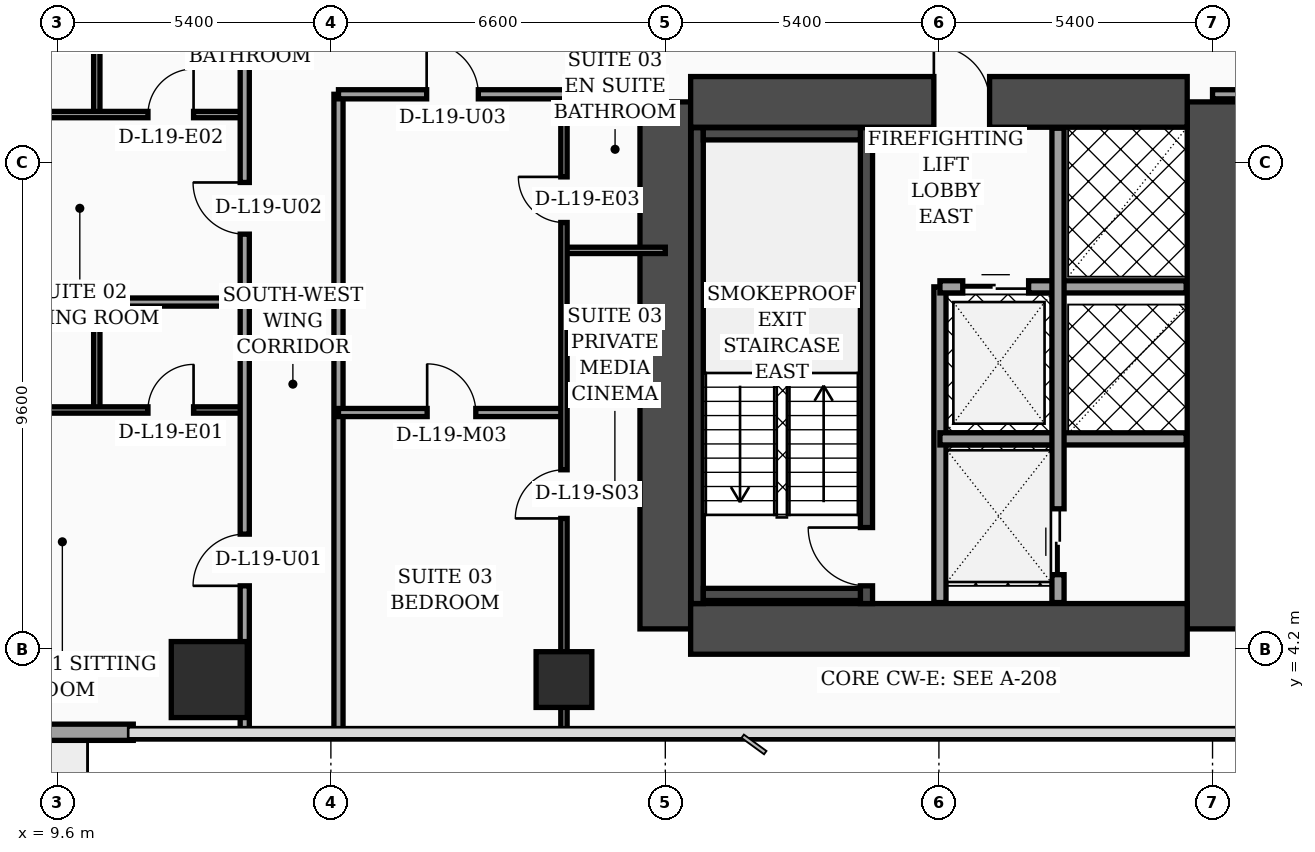
"""IFC4 building model, lengths in metres.
Left out: names, types, materials, properties, quantities, classifications, styles, units other than length and angle.
Written with IfcOpenShell. Run it as: python <this file> out.ifc"""

import sys

from ifc_helpers import new_model, si_unit, direction, frame, frame_2d, origin, origin_2d, place, context, subcontext, project, spatial, rectangle, hollow_rectangle, extrude, element, fill, save


model = new_model("IFC4")
c1 = context("Model", 3, precision=1e-05, world=origin(), true_north=direction((0.0, 1.0)))
c2 = subcontext(c1, "Body", "Model", "MODEL_VIEW")
j1 = project(units=[si_unit("LENGTHUNIT", "METRE"), si_unit("PLANEANGLEUNIT", "RADIAN")], contexts=[c1])
p1 = place(None, origin())
s1 = spatial("IfcSite", under=j1, at=p1, CompositionType="ELEMENT")
p2 = place(p1, origin())
s2 = spatial("IfcBuilding", under=s1, at=p2, CompositionType="ELEMENT")
p3 = place(p2, frame((0.0, 0.0, 81.2)))
s3 = spatial("IfcBuildingStorey", under=s2, at=p3, CompositionType="ELEMENT", Elevation=81.2)
for number, where, z_axis, x_axis in (
    (1, (21.6, 4.6, 0.0), (0.0, 0.0, 1.0), (0.0, 1.0, 0.0)),
    (2, (32.4, 4.6, 0.0), (0.0, 0.0, 1.0), (0.0, 1.0, 0.0)),
):
    element("IfcWall", number, at=place(p3, frame(where, z_axis=z_axis, x_axis=x_axis)), inside=s3, PredefinedType="SHEAR", context=c2, shape_type="SweptSolid", body=[
        extrude(rectangle(XDim=10.4, YDim=1.0, at=frame_2d((5.2, 0.0))), origin(), (0.0, 0.0, 1.0), 3.56),
    ])
p4 = place(p3, frame((22.1, 15.0, 0.0), z_axis=(0.0, 0.0, 1.0), x_axis=(1.0, 0.0, 0.0)))
e3 = element("IfcWall", 3, at=p4, inside=s3, PredefinedType="SHEAR", context=c2, shape_type="SweptSolid", body=[
    extrude(rectangle(XDim=9.8, YDim=1.0, at=frame_2d((4.9, 0.0))), origin(), (0.0, 0.0, 1.0), 3.56),
])
p5 = place(p4, frame((4.8, 0.0, 0.0)))
e4 = element("IfcOpeningElement", 4, at=p5, cuts=e3, PredefinedType="OPENING", context=c2, shape_type="SweptSolid", body=[
    extrude(rectangle(XDim=1.1, YDim=2.2, at=frame_2d((0.55, 1.1))), frame((0.0, 0.51, 0.0), z_axis=(0.0, -1.0, 0.0), x_axis=(1.0, 0.0, 0.0)), (0.0, 0.0, 1.0), 1.02),
])
p6 = place(p3, frame((22.1, 4.6, 0.0), z_axis=(0.0, 0.0, 1.0), x_axis=(1.0, 0.0, 0.0)))
e5 = element("IfcWall", 5, at=p6, inside=s3, PredefinedType="SHEAR", context=c2, shape_type="SweptSolid", body=[
    extrude(rectangle(XDim=9.8, YDim=1.0, at=frame_2d((4.9, 0.0))), origin(), (0.0, 0.0, 1.0), 3.56),
])
p7 = place(p3, frame((22.23, 5.1, 0.0), z_axis=(0.0, 0.0, 1.0), x_axis=(0.0, 1.0, 0.0)))
e6 = element("IfcWall", 6, at=p7, inside=s3, PredefinedType="SOLIDWALL", context=c2, shape_type="SweptSolid", body=[
    extrude(rectangle(XDim=9.39, YDim=0.24, at=frame_2d((4.695, 0.0))), origin(), (0.0, 0.0, 1.0), 3.56),
])
p8 = place(p3, frame((25.57, 5.1, 0.0), z_axis=(0.0, 0.0, 1.0), x_axis=(0.0, 1.0, 0.0)))
e7 = element("IfcWall", 7, at=p8, inside=s3, PredefinedType="SOLIDWALL", context=c2, shape_type="SweptSolid", body=[
    extrude(rectangle(XDim=9.39, YDim=0.24, at=frame_2d((4.695, 0.0))), origin(), (0.0, 0.0, 1.0), 3.56),
])
p9 = place(p8, frame((0.35, 0.0, 0.0)))
e8 = element("IfcOpeningElement", 8, at=p9, cuts=e7, PredefinedType="OPENING", context=c2, shape_type="SweptSolid", body=[
    extrude(rectangle(XDim=1.15, YDim=2.2, at=frame_2d((0.575, 1.1))), frame((0.0, 0.13, 0.0), z_axis=(0.0, -1.0, 0.0), x_axis=(1.0, 0.0, 0.0)), (0.0, 0.0, 1.0), 0.26),
])
for number, where, z_axis, x_axis in (
    (9, (22.35, 5.28, 0.0), (0.0, 0.0, 1.0), (1.0, 0.0, 0.0)),
    (10, (22.35, 14.37, 0.0), (0.0, 0.0, 1.0), (1.0, 0.0, 0.0)),
):
    element("IfcWall", number, at=place(p3, frame(where, z_axis=z_axis, x_axis=x_axis)), inside=s3, PredefinedType="SOLIDWALL", context=c2, shape_type="SweptSolid", body=[
        extrude(rectangle(XDim=3.1, YDim=0.24, at=frame_2d((1.55, 0.0))), origin(), (0.0, 0.0, 1.0), 3.56),
    ])
p10 = place(p3, frame((12.6, 3.6, 0.0), z_axis=(0.0, 0.0, 1.0), x_axis=(1.0, 0.0, 0.0)))
e11 = element("IfcColumn", 11, at=p10, inside=s3, PredefinedType="COLUMN", context=c2, shape_type="SweptSolid", body=[
    extrude(rectangle(XDim=1.5, YDim=1.5, at=origin_2d()), origin(), (0.0, 0.0, 1.0), 3.56),
])
p11 = place(p3, frame((19.6, 3.6, 0.0), z_axis=(0.0, 0.0, 1.0), x_axis=(1.0, 0.0, 0.0)))
e12 = element("IfcColumn", 12, at=p11, inside=s3, PredefinedType="COLUMN", context=c2, shape_type="SweptSolid", body=[
    extrude(hollow_rectangle(XDim=1.1, YDim=1.1, WallThickness=0.045, at=origin_2d()), origin(), (0.0, 0.0, 1.0), 3.56),
])
p12 = place(p3, frame((3.1, 2.56, 0.0), z_axis=(0.0, 0.0, 1.0), x_axis=(1.0, 0.0, 0.0)))
e13 = element("IfcWall", 13, at=p12, inside=s3, PredefinedType="SOLIDWALL", context=c2, shape_type="SweptSolid", body=[
    extrude(rectangle(XDim=8.0, YDim=0.32, at=frame_2d((4.0, 0.0))), origin(), (0.0, 0.0, 1.0), 3.56),
])
p13 = place(p12, frame((0.45, 0.0, 0.75)))
e14 = element("IfcOpeningElement", 14, at=p13, cuts=e13, PredefinedType="OPENING", context=c2, shape_type="SweptSolid", body=[
    extrude(rectangle(XDim=1.0, YDim=1.6, at=frame_2d((0.5, 0.8))), frame((0.0, 0.17, 0.0), z_axis=(0.0, -1.0, 0.0), x_axis=(1.0, 0.0, 0.0)), (0.0, 0.0, 1.0), 0.34),
])
p14 = place(p12, frame((4.2, 0.0, 0.0)))
e15 = element("IfcOpeningElement", 15, at=p14, cuts=e13, PredefinedType="OPENING", context=c2, shape_type="SweptSolid", body=[
    extrude(rectangle(XDim=1.4, YDim=2.25, at=frame_2d((0.7, 1.125))), frame((0.0, 0.17, 0.0), z_axis=(0.0, -1.0, 0.0), x_axis=(1.0, 0.0, 0.0)), (0.0, 0.0, 1.0), 0.34),
])
p15 = place(p3, frame((27.02, 5.12, 0.0), z_axis=(0.0, 0.0, 1.0), x_axis=(0.0, 1.0, 0.0)))
e16 = element("IfcWall", 16, at=p15, inside=s3, PredefinedType="SOLIDWALL", context=c2, shape_type="SweptSolid", body=[
    extrude(rectangle(XDim=6.23, YDim=0.24, at=frame_2d((3.115, 0.0))), origin(), (0.0, 0.0, 1.0), 3.56),
])
p16 = place(p3, frame((27.02, 11.35, 0.0), z_axis=(0.0, 0.0, 1.0), x_axis=(1.0, 0.0, 0.0)))
e17 = element("IfcWall", 17, at=p16, inside=s3, PredefinedType="SOLIDWALL", context=c2, shape_type="SweptSolid", body=[
    extrude(rectangle(XDim=4.86, YDim=0.24, at=frame_2d((2.43, 0.0))), origin(), (0.0, 0.0, 1.0), 3.56),
])
p17 = place(p16, frame((0.45, 0.0, 0.0)))
e18 = element("IfcOpeningElement", 18, at=p17, cuts=e17, PredefinedType="OPENING", context=c2, shape_type="SweptSolid", body=[
    extrude(rectangle(XDim=1.3, YDim=2.35, at=frame_2d((0.65, 1.175))), frame((0.0, 0.13, 0.0), z_axis=(0.0, -1.0, 0.0), x_axis=(1.0, 0.0, 0.0)), (0.0, 0.0, 1.0), 0.26),
])
p18 = place(p3, frame((27.02, 8.35, 0.0), z_axis=(0.0, 0.0, 1.0), x_axis=(1.0, 0.0, 0.0)))
e19 = element("IfcWall", 19, at=p18, inside=s3, PredefinedType="SOLIDWALL", context=c2, shape_type="SweptSolid", body=[
    extrude(rectangle(XDim=4.86, YDim=0.24, at=frame_2d((2.43, 0.0))), origin(), (0.0, 0.0, 1.0), 3.56),
])
p19 = place(p3, frame((29.35, 5.12, 0.0), z_axis=(0.0, 0.0, 1.0), x_axis=(0.0, 1.0, 0.0)))
e20 = element("IfcWall", 20, at=p19, inside=s3, PredefinedType="SOLIDWALL", context=c2, shape_type="SweptSolid", body=[
    extrude(rectangle(XDim=9.36, YDim=0.24, at=frame_2d((4.68, 0.0))), origin(), (0.0, 0.0, 1.0), 3.56),
])
p20 = place(p19, frame((0.55, 0.0, 0.0)))
e21 = element("IfcOpeningElement", 21, at=p20, cuts=e20, PredefinedType="OPENING", context=c2, shape_type="SweptSolid", body=[
    extrude(rectangle(XDim=1.3, YDim=2.35, at=frame_2d((0.65, 1.175))), frame((0.0, 0.13, 0.0), z_axis=(0.0, -1.0, 0.0), x_axis=(1.0, 0.0, 0.0)), (0.0, 0.0, 1.0), 0.26),
])
p21 = place(p3, frame((10.38, 8.92, 0.0), z_axis=(0.0, 0.0, 1.0), x_axis=(0.0, 1.0, 0.0)))
e22 = element("IfcWall", 22, at=p21, inside=s3, PredefinedType="PARTITIONING", context=c2, shape_type="SweptSolid", body=[
    extrude(rectangle(XDim=2.13, YDim=0.125, at=frame_2d((1.065, 0.0))), origin(), (0.0, 0.0, 1.0), 3.09),
])
p22 = place(p3, frame((3.2, 8.92, 0.0), z_axis=(0.0, 0.0, 1.0), x_axis=(1.0, 0.0, 0.0)))
e23 = element("IfcWall", 23, at=p22, inside=s3, PredefinedType="PARTITIONING", context=c2, shape_type="SweptSolid", body=[
    extrude(rectangle(XDim=10.1, YDim=0.125, at=frame_2d((5.05, 0.0))), origin(), (0.0, 0.0, 1.0), 2.84),
])
p23 = place(p22, frame((3.29, 0.0, 0.0)))
e24 = element("IfcOpeningElement", 24, at=p23, cuts=e23, PredefinedType="OPENING", context=c2, shape_type="SweptSolid", body=[
    extrude(rectangle(XDim=0.96, YDim=2.2, at=frame_2d((0.48, 1.1))), frame((0.0, 0.073, 0.0), z_axis=(0.0, -1.0, 0.0), x_axis=(1.0, 0.0, 0.0)), (0.0, 0.0, 1.0), 0.145),
])
p24 = place(p22, frame((8.19, 0.0, 0.0)))
e25 = element("IfcOpeningElement", 25, at=p24, cuts=e23, PredefinedType="OPENING", context=c2, shape_type="SweptSolid", body=[
    extrude(rectangle(XDim=0.9, YDim=2.15, at=frame_2d((0.45, 1.075))), frame((0.0, 0.073, 0.0), z_axis=(0.0, -1.0, 0.0), x_axis=(1.0, 0.0, 0.0)), (0.0, 0.0, 1.0), 0.145),
])
p25 = place(p3, frame((10.38, 14.75, 0.0), z_axis=(0.0, 0.0, 1.0), x_axis=(0.0, 1.0, 0.0)))
e26 = element("IfcWall", 26, at=p25, inside=s3, PredefinedType="PARTITIONING", context=c2, shape_type="SweptSolid", body=[
    extrude(rectangle(XDim=2.05, YDim=0.125, at=frame_2d((1.025, 0.0))), origin(), (0.0, 0.0, 1.0), 3.56),
])
p26 = place(p3, frame((0.08, 14.75, 0.0), z_axis=(0.0, 0.0, 1.0), x_axis=(1.0, 0.0, 0.0)))
e27 = element("IfcWall", 27, at=p26, inside=s3, PredefinedType="PARTITIONING", context=c2, shape_type="SweptSolid", body=[
    extrude(rectangle(XDim=13.22, YDim=0.125, at=frame_2d((6.61, 0.0))), origin(), (0.0, 0.0, 1.0), 2.84),
])
p27 = place(p26, frame((4.67, 0.0, 0.0)))
e28 = element("IfcOpeningElement", 28, at=p27, cuts=e27, PredefinedType="OPENING", context=c2, shape_type="SweptSolid", body=[
    extrude(rectangle(XDim=0.96, YDim=2.2, at=frame_2d((0.48, 1.1))), frame((0.0, 0.073, 0.0), z_axis=(0.0, -1.0, 0.0), x_axis=(1.0, 0.0, 0.0)), (0.0, 0.0, 1.0), 0.145),
])
p28 = place(p26, frame((11.31, 0.0, 0.0)))
e29 = element("IfcOpeningElement", 29, at=p28, cuts=e27, PredefinedType="OPENING", context=c2, shape_type="SweptSolid", body=[
    extrude(rectangle(XDim=0.9, YDim=2.15, at=frame_2d((0.45, 1.075))), frame((0.0, 0.073, 0.0), z_axis=(0.0, -1.0, 0.0), x_axis=(1.0, 0.0, 0.0)), (0.0, 0.0, 1.0), 0.145),
])
p29 = place(p3, frame((0.08, 11.05, 0.0), z_axis=(0.0, 0.0, 1.0), x_axis=(1.0, 0.0, 0.0)))
e30 = element("IfcWall", 30, at=p29, inside=s3, PredefinedType="PARTITIONING", context=c2, shape_type="SweptSolid", body=[
    extrude(rectangle(XDim=13.22, YDim=0.16, at=frame_2d((6.61, 0.0))), origin(), (0.0, 0.0, 1.0), 2.84),
])
p30 = place(p3, frame((13.3, 2.44, 0.0), z_axis=(0.0, 0.0, 1.0), x_axis=(0.0, 1.0, 0.0)))
e31 = element("IfcWall", 31, at=p30, inside=s3, PredefinedType="PARTITIONING", context=c2, shape_type="SweptSolid", body=[
    extrude(rectangle(XDim=14.36, YDim=0.18, at=frame_2d((7.18, 0.0))), origin(), (0.0, 0.0, 1.0), 3.04),
])
p31 = place(p30, frame((3.01, 0.0, 0.0)))
e32 = element("IfcOpeningElement", 32, at=p31, cuts=e31, PredefinedType="OPENING", context=c2, shape_type="SweptSolid", body=[
    extrude(rectangle(XDim=1.02, YDim=2.2, at=frame_2d((0.51, 1.1))), frame((0.0, 0.1, 0.0), z_axis=(0.0, -1.0, 0.0), x_axis=(1.0, 0.0, 0.0)), (0.0, 0.0, 1.0), 0.2),
])
p32 = place(p30, frame((9.95, 0.0, 0.0)))
e33 = element("IfcOpeningElement", 33, at=p32, cuts=e31, PredefinedType="OPENING", context=c2, shape_type="SweptSolid", body=[
    extrude(rectangle(XDim=1.02, YDim=2.2, at=frame_2d((0.51, 1.1))), frame((0.0, 0.1, 0.0), z_axis=(0.0, -1.0, 0.0), x_axis=(1.0, 0.0, 0.0)), (0.0, 0.0, 1.0), 0.2),
])
p33 = place(p3, frame((15.15, 2.44, 0.0), z_axis=(0.0, 0.0, 1.0), x_axis=(0.0, 1.0, 0.0)))
e34 = element("IfcWall", 34, at=p33, inside=s3, PredefinedType="PARTITIONING", context=c2, shape_type="SweptSolid", body=[
    extrude(rectangle(XDim=12.71, YDim=0.18, at=frame_2d((6.355, 0.0))), origin(), (0.0, 0.0, 1.0), 3.04),
])
p34 = place(p3, frame((19.6, 12.07, 0.0), z_axis=(0.0, 0.0, 1.0), x_axis=(1.0, 0.0, 0.0)))
e35 = element("IfcWall", 35, at=p34, inside=s3, PredefinedType="PARTITIONING", context=c2, shape_type="SweptSolid", body=[
    extrude(rectangle(XDim=2.0, YDim=0.125, at=frame_2d((1.0, 0.0))), origin(), (0.0, 0.0, 1.0), 3.56),
])
p35 = place(p3, frame((15.15, 8.87, 0.0), z_axis=(0.0, 0.0, 1.0), x_axis=(1.0, 0.0, 0.0)))
e36 = element("IfcWall", 36, at=p35, inside=s3, PredefinedType="PARTITIONING", context=c2, shape_type="SweptSolid", body=[
    extrude(rectangle(XDim=4.45, YDim=0.16, at=frame_2d((2.225, 0.0))), origin(), (0.0, 0.0, 1.0), 3.56),
])
p36 = place(p35, frame((1.75, 0.0, 0.0)))
e37 = element("IfcOpeningElement", 37, at=p36, cuts=e36, PredefinedType="OPENING", context=c2, shape_type="SweptSolid", body=[
    extrude(rectangle(XDim=0.96, YDim=2.2, at=frame_2d((0.48, 1.1))), frame((0.0, 0.09, 0.0), z_axis=(0.0, -1.0, 0.0), x_axis=(1.0, 0.0, 0.0)), (0.0, 0.0, 1.0), 0.18),
])
p37 = place(p3, frame((19.6, 2.44, 0.0), z_axis=(0.0, 0.0, 1.0), x_axis=(0.0, 1.0, 0.0)))
e38 = element("IfcWall", 38, at=p37, inside=s3, PredefinedType="PARTITIONING", context=c2, shape_type="SweptSolid", body=[
    extrude(rectangle(XDim=12.71, YDim=0.125, at=frame_2d((6.355, 0.0))), origin(), (0.0, 0.0, 1.0), 2.34),
])
p38 = place(p37, frame((4.34, 0.0, 0.0)))
e39 = element("IfcOpeningElement", 39, at=p38, cuts=e38, PredefinedType="OPENING", context=c2, shape_type="SweptSolid", body=[
    extrude(rectangle(XDim=0.96, YDim=2.2, at=frame_2d((0.48, 1.1))), frame((0.0, 0.073, 0.0), z_axis=(0.0, -1.0, 0.0), x_axis=(1.0, 0.0, 0.0)), (0.0, 0.0, 1.0), 0.145),
])
p39 = place(p37, frame((10.18, 0.0, 0.0)))
e40 = element("IfcOpeningElement", 40, at=p39, cuts=e38, PredefinedType="OPENING", context=c2, shape_type="SweptSolid", body=[
    extrude(rectangle(XDim=0.9, YDim=2.15, at=frame_2d((0.45, 1.075))), frame((0.0, 0.073, 0.0), z_axis=(0.0, -1.0, 0.0), x_axis=(1.0, 0.0, 0.0)), (0.0, 0.0, 1.0), 0.145),
])
p40 = place(p3, frame((15.15, 15.15, 0.0), z_axis=(0.0, 0.0, 1.0), x_axis=(1.0, 0.0, 0.0)))
e41 = element("IfcWall", 41, at=p40, inside=s3, PredefinedType="PARTITIONING", context=c2, shape_type="SweptSolid", body=[
    extrude(rectangle(XDim=6.45, YDim=0.18, at=frame_2d((3.225, 0.0))), origin(), (0.0, 0.0, 1.0), 2.34),
])
p41 = place(p40, frame((1.74, 0.0, 0.0)))
e42 = element("IfcOpeningElement", 42, at=p41, cuts=e41, PredefinedType="OPENING", context=c2, shape_type="SweptSolid", body=[
    extrude(rectangle(XDim=1.02, YDim=2.2, at=frame_2d((0.51, 1.1))), frame((0.0, 0.1, 0.0), z_axis=(0.0, -1.0, 0.0), x_axis=(1.0, 0.0, 0.0)), (0.0, 0.0, 1.0), 0.2),
])
p42 = place(p3, frame((32.4, 15.15, 0.0), z_axis=(0.0, 0.0, 1.0), x_axis=(1.0, 0.0, 0.0)))
e43 = element("IfcWall", 43, at=p42, inside=s3, PredefinedType="PARTITIONING", context=c2, shape_type="SweptSolid", body=[
    extrude(rectangle(XDim=20.85, YDim=0.18, at=frame_2d((10.425, 0.0))), origin(), (0.0, 0.0, 1.0), 2.84),
])
p43 = place(p42, frame((1.1, 0.0, 0.0)))
e44 = element("IfcOpeningElement", 44, at=p43, cuts=e43, PredefinedType="OPENING", context=c2, shape_type="SweptSolid", body=[
    extrude(rectangle(XDim=1.5, YDim=2.22, at=frame_2d((0.75, 1.11))), frame((0.0, 0.1, 0.0), z_axis=(0.0, -1.0, 0.0), x_axis=(1.0, 0.0, 0.0)), (0.0, 0.0, 1.0), 0.2),
])
p44 = place(p42, frame((9.94, 0.0, 0.0)))
e45 = element("IfcOpeningElement", 45, at=p44, cuts=e43, PredefinedType="OPENING", context=c2, shape_type="SweptSolid", body=[
    extrude(rectangle(XDim=1.02, YDim=2.2, at=frame_2d((0.51, 1.1))), frame((0.0, 0.1, 0.0), z_axis=(0.0, -1.0, 0.0), x_axis=(1.0, 0.0, 0.0)), (0.0, 0.0, 1.0), 0.2),
])
p45 = place(p42, frame((15.92, 0.0, 0.0)))
e46 = element("IfcOpeningElement", 46, at=p45, cuts=e43, PredefinedType="OPENING", context=c2, shape_type="SweptSolid", body=[
    extrude(rectangle(XDim=1.02, YDim=2.2, at=frame_2d((0.51, 1.1))), frame((0.0, 0.1, 0.0), z_axis=(0.0, -1.0, 0.0), x_axis=(1.0, 0.0, 0.0)), (0.0, 0.0, 1.0), 0.2),
])
p46 = place(p17, origin())
e47 = element("IfcDoor", 47, at=p46, inside=s3, OperationType="DOUBLE_DOOR_SLIDING", PredefinedType="DOOR", context=c2, shape_type="SweptSolid", body=[
    extrude(rectangle(XDim=1.3, YDim=2.35, at=frame_2d((0.65, 1.175))), frame((0.0, 0.025, 0.0), z_axis=(0.0, -1.0, 0.0), x_axis=(1.0, 0.0, 0.0)), (0.0, 0.0, 1.0), 0.05),
])
fill(e18, e47)
p47 = place(p20, origin())
e48 = element("IfcDoor", 48, at=p47, inside=s3, OperationType="DOUBLE_DOOR_SLIDING", PredefinedType="DOOR", context=c2, shape_type="SweptSolid", body=[
    extrude(rectangle(XDim=1.3, YDim=2.35, at=frame_2d((0.65, 1.175))), frame((0.0, 0.025, 0.0), z_axis=(0.0, -1.0, 0.0), x_axis=(1.0, 0.0, 0.0)), (0.0, 0.0, 1.0), 0.05),
])
fill(e21, e48)
p48 = place(p24, origin())
e49 = element("IfcDoor", 49, at=p48, inside=s3, OperationType="SINGLE_SWING_RIGHT", PredefinedType="DOOR", context=c2, shape_type="SweptSolid", body=[
    extrude(rectangle(XDim=0.9, YDim=2.15, at=frame_2d((0.45, 1.075))), frame((0.0, 0.025, 0.0), z_axis=(0.0, -1.0, 0.0), x_axis=(1.0, 0.0, 0.0)), (0.0, 0.0, 1.0), 0.05),
])
fill(e25, e49)
p49 = place(p28, origin())
e50 = element("IfcDoor", 50, at=p49, inside=s3, OperationType="SINGLE_SWING_RIGHT", PredefinedType="DOOR", context=c2, shape_type="SweptSolid", body=[
    extrude(rectangle(XDim=0.9, YDim=2.15, at=frame_2d((0.45, 1.075))), frame((0.0, 0.025, 0.0), z_axis=(0.0, -1.0, 0.0), x_axis=(1.0, 0.0, 0.0)), (0.0, 0.0, 1.0), 0.05),
])
fill(e29, e50)
p50 = place(p31, origin())
e51 = element("IfcDoor", 51, at=p50, inside=s3, OperationType="SINGLE_SWING_LEFT", PredefinedType="DOOR", context=c2, shape_type="SweptSolid", body=[
    extrude(rectangle(XDim=1.02, YDim=2.2, at=frame_2d((0.51, 1.1))), frame((0.0, 0.025, 0.0), z_axis=(0.0, -1.0, 0.0), x_axis=(1.0, 0.0, 0.0)), (0.0, 0.0, 1.0), 0.05),
])
fill(e32, e51)
p51 = place(p32, origin())
e52 = element("IfcDoor", 52, at=p51, inside=s3, OperationType="SINGLE_SWING_RIGHT", PredefinedType="DOOR", context=c2, shape_type="SweptSolid", body=[
    extrude(rectangle(XDim=1.02, YDim=2.2, at=frame_2d((0.51, 1.1))), frame((0.0, 0.025, 0.0), z_axis=(0.0, -1.0, 0.0), x_axis=(1.0, 0.0, 0.0)), (0.0, 0.0, 1.0), 0.05),
])
fill(e33, e52)
p52 = place(p36, origin())
e53 = element("IfcDoor", 53, at=p52, inside=s3, OperationType="SINGLE_SWING_LEFT", PredefinedType="DOOR", context=c2, shape_type="SweptSolid", body=[
    extrude(rectangle(XDim=0.96, YDim=2.2, at=frame_2d((0.48, 1.1))), frame((0.0, 0.025, 0.0), z_axis=(0.0, -1.0, 0.0), x_axis=(1.0, 0.0, 0.0)), (0.0, 0.0, 1.0), 0.05),
])
fill(e37, e53)
p53 = place(p38, origin())
e54 = element("IfcDoor", 54, at=p53, inside=s3, OperationType="SINGLE_SWING_LEFT", PredefinedType="DOOR", context=c2, shape_type="SweptSolid", body=[
    extrude(rectangle(XDim=0.96, YDim=2.2, at=frame_2d((0.48, 1.1))), frame((0.0, 0.025, 0.0), z_axis=(0.0, -1.0, 0.0), x_axis=(1.0, 0.0, 0.0)), (0.0, 0.0, 1.0), 0.05),
])
fill(e39, e54)
p54 = place(p39, origin())
e55 = element("IfcDoor", 55, at=p54, inside=s3, OperationType="SINGLE_SWING_RIGHT", PredefinedType="DOOR", context=c2, shape_type="SweptSolid", body=[
    extrude(rectangle(XDim=0.9, YDim=2.15, at=frame_2d((0.45, 1.075))), frame((0.0, 0.025, 0.0), z_axis=(0.0, -1.0, 0.0), x_axis=(1.0, 0.0, 0.0)), (0.0, 0.0, 1.0), 0.05),
])
fill(e40, e55)
p55 = place(p41, origin())
e56 = element("IfcDoor", 56, at=p55, inside=s3, OperationType="SINGLE_SWING_LEFT", PredefinedType="DOOR", context=c2, shape_type="SweptSolid", body=[
    extrude(rectangle(XDim=1.02, YDim=2.2, at=frame_2d((0.51, 1.1))), frame((0.0, 0.025, 0.0), z_axis=(0.0, -1.0, 0.0), x_axis=(1.0, 0.0, 0.0)), (0.0, 0.0, 1.0), 0.05),
])
fill(e42, e56)
p56 = place(p9, origin())
e57 = element("IfcDoor", 57, at=p56, inside=s3, OperationType="SINGLE_SWING_RIGHT", PredefinedType="DOOR", context=c2, shape_type="SweptSolid", body=[
    extrude(rectangle(XDim=1.15, YDim=2.2, at=frame_2d((0.575, 1.1))), frame((0.0, 0.025, 0.0), z_axis=(0.0, -1.0, 0.0), x_axis=(1.0, 0.0, 0.0)), (0.0, 0.0, 1.0), 0.05),
])
fill(e8, e57)
p57 = place(p5, origin())
e58 = element("IfcDoor", 58, at=p57, inside=s3, OperationType="SINGLE_SWING_LEFT", PredefinedType="DOOR", context=c2, shape_type="SweptSolid", body=[
    extrude(rectangle(XDim=1.1, YDim=2.2, at=frame_2d((0.55, 1.1))), frame((0.0, 0.025, 0.0), z_axis=(0.0, -1.0, 0.0), x_axis=(1.0, 0.0, 0.0)), (0.0, 0.0, 1.0), 0.05),
])
fill(e4, e58)
save(model, sys.argv[1])
